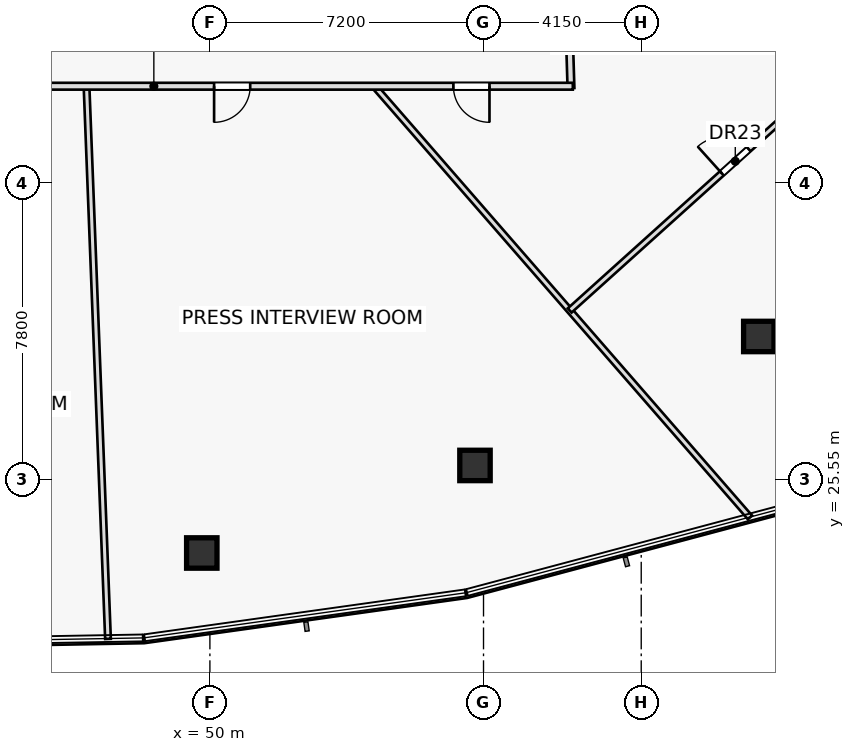
"""IFC4 building model, lengths in metres.
Left out: names, types, materials, properties, quantities, classifications, styles, units other than length and angle.
Written with IfcOpenShell. Run it as: python <this file> out.ifc"""

import sys

from ifc_helpers import new_model, si_unit, direction, frame, frame_2d, origin, origin_2d, place, context, subcontext, project, spatial, rectangle, hollow_rectangle, extrude, element, fill, save


model = new_model("IFC4")
c1 = context("Model", 3, precision=1e-05, world=origin(), true_north=direction((0.0, 1.0)))
c2 = subcontext(c1, "Body", "Model", "MODEL_VIEW")
j1 = project(units=[si_unit("LENGTHUNIT", "METRE"), si_unit("PLANEANGLEUNIT", "RADIAN")], contexts=[c1])
p1 = place(None, origin())
s1 = spatial("IfcSite", under=j1, at=p1, CompositionType="ELEMENT")
p2 = place(p1, origin())
s2 = spatial("IfcBuilding", under=s1, at=p2, CompositionType="ELEMENT")
p3 = place(p2, frame((0.0, 0.0, 43.2)))
s3 = spatial("IfcBuildingStorey", under=s2, at=p3, CompositionType="ELEMENT", Elevation=43.2)
for number, where, z_axis, x_axis in (
    (1, (49.787, 23.618, 0.0), (0.0, 0.0, 1.0), (1.0, 0.0, 0.0)),
    (2, (56.975, 25.921, 0.0), (0.0, 0.0, 1.0), (1.0, 0.0, 0.0)),
    (3, (64.444, 29.315, 0.0), (0.0, 0.0, 1.0), (1.0, 0.0, 0.0)),
):
    element("IfcColumn", number, at=place(p3, frame(where, z_axis=z_axis, x_axis=x_axis)), inside=s3, PredefinedType="COLUMN", context=c2, shape_type="SweptSolid", body=[
        extrude(hollow_rectangle(XDim=0.8, YDim=0.8, WallThickness=0.045, at=origin_2d()), origin(), (0.0, 0.0, 1.0), 3.6),
    ])
p4 = place(p3, frame((46.753, 35.9, 0.0), z_axis=(0.0, 0.0, 1.0), x_axis=(0.038834483787, -0.999245656918, 0.0)))
e4 = element("IfcWall", 4, at=p4, inside=s3, PredefinedType="PARTITIONING", context=c2, shape_type="SweptSolid", body=[
    extrude(rectangle(XDim=14.554, YDim=0.15, at=frame_2d((7.277, 0.0))), origin(), (0.0, 0.0, 1.0), 2.925),
])
p5 = place(p3, frame((54.327, 35.9, 0.0), z_axis=(0.0, 0.0, 1.0), x_axis=(0.656862876703, -0.754010053785, 0.0)))
e5 = element("IfcWall", 5, at=p5, inside=s3, PredefinedType="PARTITIONING", context=c2, shape_type="SweptSolid", body=[
    extrude(rectangle(XDim=15.048, YDim=0.15, at=frame_2d((7.524, 0.0))), origin(), (0.0, 0.0, 1.0), 2.925),
])
p6 = place(p3, frame((59.352, 40.748, 0.0), z_axis=(0.0, 0.0, 1.0), x_axis=(0.95011325809, -0.31190510865, 0.0)))
e6 = element("IfcWall", 6, at=p6, inside=s3, PredefinedType="PARTITIONING", context=c2, shape_type="SweptSolid", body=[
    extrude(rectangle(XDim=17.872, YDim=0.15, at=frame_2d((8.936, 0.0))), origin(), (0.0, 0.0, 1.0), 2.925),
])
p7 = place(p3, frame((59.467, 30.0, 0.0), z_axis=(0.0, 0.0, 1.0), x_axis=(0.743038445117, 0.669248734835, 0.0)))
e7 = element("IfcWall", 7, at=p7, inside=s3, PredefinedType="PARTITIONING", context=c2, shape_type="SweptSolid", body=[
    extrude(rectangle(XDim=11.729, YDim=0.15, at=frame_2d((5.865, 0.0))), origin(), (0.0, 0.0, 1.0), 2.925),
])
p8 = place(p7, frame((5.389, 0.0, 0.0)))
e8 = element("IfcOpeningElement", 8, at=p8, cuts=e7, PredefinedType="OPENING", context=c2, shape_type="SweptSolid", body=[
    extrude(rectangle(XDim=0.95, YDim=2.05, at=frame_2d((0.475, 1.025))), frame((0.0, 0.085, 0.0), z_axis=(0.0, -1.0, 0.0), x_axis=(1.0, 0.0, 0.0)), (0.0, 0.0, 1.0), 0.17),
])
p9 = place(p3, frame((59.342, 41.1, 0.0), z_axis=(0.0, 0.0, 1.0), x_axis=(0.030445329425, -0.999536433511, 0.0)))
e9 = element("IfcWall", 9, at=p9, inside=s3, PredefinedType="PARTITIONING", context=c2, shape_type="SweptSolid", body=[
    extrude(rectangle(XDim=5.252, YDim=0.18, at=frame_2d((2.626, 0.0))), origin(), (0.0, 0.0, 1.0), 2.925),
])
p10 = place(p3, frame((59.55, 35.9, 0.0), z_axis=(0.0, 0.0, 1.0), x_axis=(-1.0, 0.0, 0.0)))
e10 = element("IfcWall", 10, at=p10, inside=s3, PredefinedType="PARTITIONING", context=c2, shape_type="SweptSolid", body=[
    extrude(rectangle(XDim=22.05, YDim=0.18, at=frame_2d((11.025, 0.0))), origin(), (0.0, 0.0, 1.0), 2.925),
])
p11 = place(p10, frame((2.193, 0.0, 0.0)))
e11 = element("IfcOpeningElement", 11, at=p11, cuts=e10, PredefinedType="OPENING", context=c2, shape_type="SweptSolid", body=[
    extrude(rectangle(XDim=0.95, YDim=2.05, at=frame_2d((0.475, 1.025))), frame((0.0, 0.1, 0.0), z_axis=(0.0, -1.0, 0.0), x_axis=(1.0, 0.0, 0.0)), (0.0, 0.0, 1.0), 0.2),
])
p12 = place(p10, frame((8.49, 0.0, 0.0)))
e12 = element("IfcOpeningElement", 12, at=p12, cuts=e10, PredefinedType="OPENING", context=c2, shape_type="SweptSolid", body=[
    extrude(rectangle(XDim=0.95, YDim=2.05, at=frame_2d((0.475, 1.025))), frame((0.0, 0.1, 0.0), z_axis=(0.0, -1.0, 0.0), x_axis=(1.0, 0.0, 0.0)), (0.0, 0.0, 1.0), 0.2),
])
p13 = place(p10, frame((14.76, 0.0, 0.0)))
e13 = element("IfcOpeningElement", 13, at=p13, cuts=e10, PredefinedType="OPENING", context=c2, shape_type="SweptSolid", body=[
    extrude(rectangle(XDim=0.95, YDim=2.05, at=frame_2d((0.475, 1.025))), frame((0.0, 0.1, 0.0), z_axis=(0.0, -1.0, 0.0), x_axis=(1.0, 0.0, 0.0)), (0.0, 0.0, 1.0), 0.2),
])
p14 = place(p10, frame((19.281, 0.0, 0.0)))
e14 = element("IfcOpeningElement", 14, at=p14, cuts=e10, PredefinedType="OPENING", context=c2, shape_type="SweptSolid", body=[
    extrude(rectangle(XDim=0.95, YDim=2.05, at=frame_2d((0.475, 1.025))), frame((0.0, 0.1, 0.0), z_axis=(0.0, -1.0, 0.0), x_axis=(1.0, 0.0, 0.0)), (0.0, 0.0, 1.0), 0.2),
])
p15 = place(p8, origin())
e15 = element("IfcDoor", 15, at=p15, inside=s3, OperationType="SINGLE_SWING_LEFT", PredefinedType="DOOR", context=c2, shape_type="SweptSolid", body=[
    extrude(rectangle(XDim=0.95, YDim=2.05, at=frame_2d((0.475, 1.025))), frame((0.0, 0.025, 0.0), z_axis=(0.0, -1.0, 0.0), x_axis=(1.0, 0.0, 0.0)), (0.0, 0.0, 1.0), 0.05),
])
fill(e8, e15)
p16 = place(p11, origin())
e16 = element("IfcDoor", 16, at=p16, inside=s3, OperationType="SINGLE_SWING_LEFT", PredefinedType="DOOR", context=c2, shape_type="SweptSolid", body=[
    extrude(rectangle(XDim=0.95, YDim=2.05, at=frame_2d((0.475, 1.025))), frame((0.0, 0.025, 0.0), z_axis=(0.0, -1.0, 0.0), x_axis=(1.0, 0.0, 0.0)), (0.0, 0.0, 1.0), 0.05),
])
fill(e11, e16)
p17 = place(p12, origin())
e17 = element("IfcDoor", 17, at=p17, inside=s3, OperationType="SINGLE_SWING_RIGHT", PredefinedType="DOOR", context=c2, shape_type="SweptSolid", body=[
    extrude(rectangle(XDim=0.95, YDim=2.05, at=frame_2d((0.475, 1.025))), frame((0.0, 0.025, 0.0), z_axis=(0.0, -1.0, 0.0), x_axis=(1.0, 0.0, 0.0)), (0.0, 0.0, 1.0), 0.05),
])
fill(e12, e17)
save(model, sys.argv[1])
